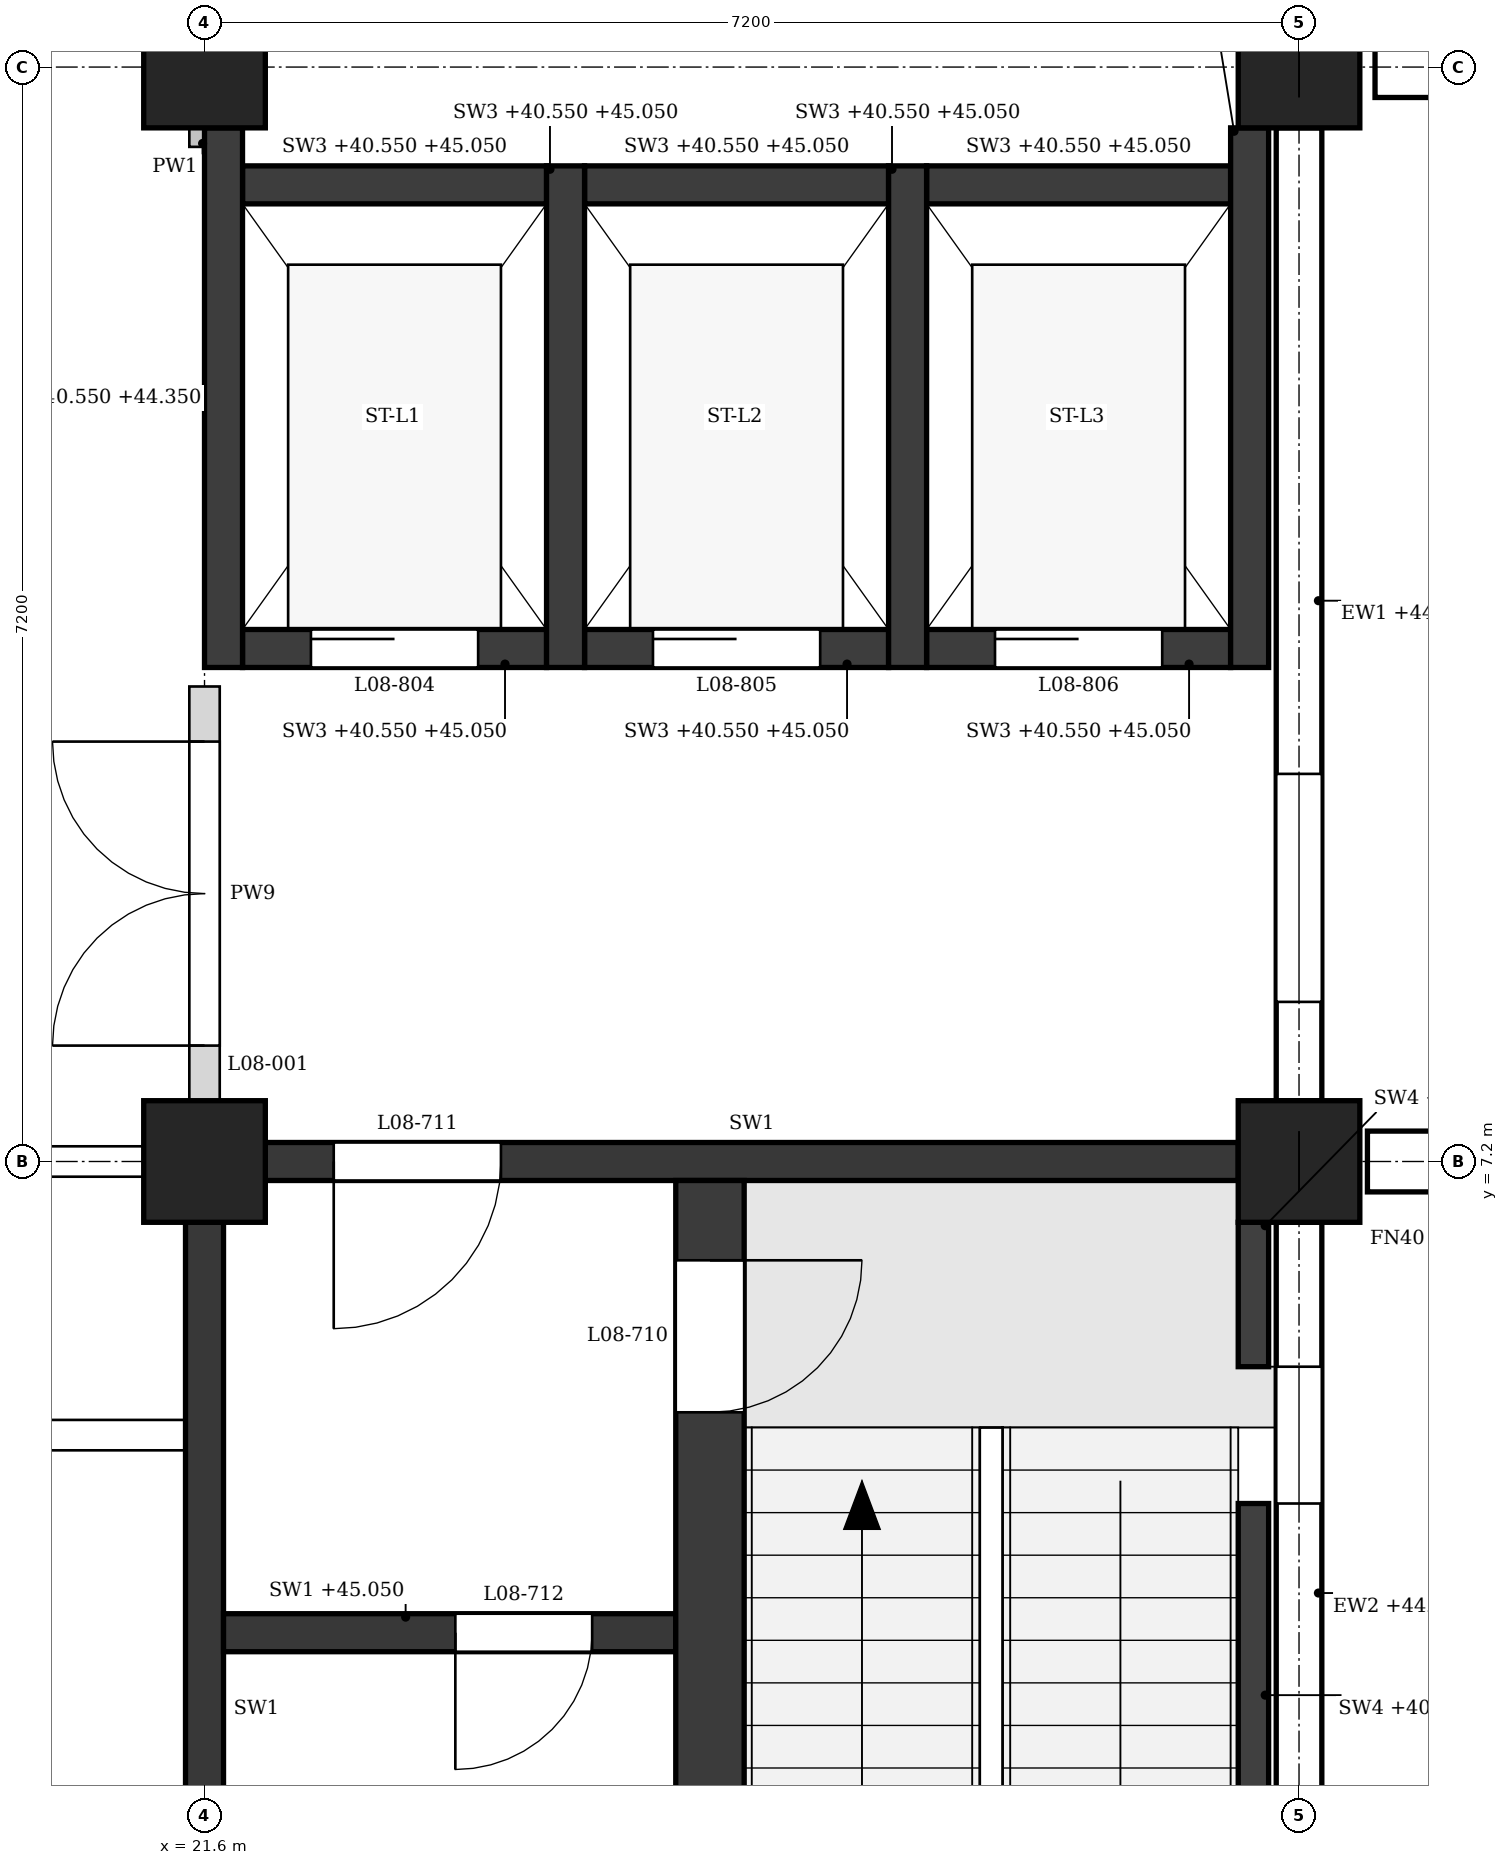
"""IFC4 building model, lengths in metres.
Left out: names, types, materials, properties, quantities, classifications, styles, units other than length and angle.
Written with IfcOpenShell. Run it as: python <this file> out.ifc"""

import sys

from ifc_helpers import new_model, si_unit, direction, frame, frame_2d, origin, origin_2d, place, context, subcontext, project, spatial, polyline, rectangle, outline, extrude, element, fill, save


model = new_model("IFC4")
c1 = context("Model", 3, precision=1e-05, world=origin(), true_north=direction((0.0, 1.0)))
c2 = subcontext(c1, "Body", "Model", "MODEL_VIEW")
j1 = project(units=[si_unit("LENGTHUNIT", "METRE"), si_unit("PLANEANGLEUNIT", "RADIAN")], contexts=[c1])
p1 = place(None, origin())
s1 = spatial("IfcSite", under=j1, at=p1, CompositionType="ELEMENT")
p2 = place(p1, origin())
s2 = spatial("IfcBuilding", under=s1, at=p2, CompositionType="ELEMENT")
p3 = place(p2, frame((0.0, 0.0, 40.8)))
s3 = spatial("IfcBuildingStorey", under=s2, at=p3, CompositionType="ELEMENT", Elevation=40.8)
for number, where, z_axis, x_axis in (
    (1, (21.6, 7.2, 0.0), (0.0, 0.0, 1.0), (1.0, 0.0, 0.0)),
    (2, (21.6, 14.4, 0.0), (0.0, 0.0, 1.0), (1.0, 0.0, 0.0)),
    (3, (28.8, 7.2, 0.0), (0.0, 0.0, 1.0), (1.0, 0.0, 0.0)),
    (4, (28.8, 14.4, 0.0), (0.0, 0.0, 1.0), (1.0, 0.0, 0.0)),
):
    element("IfcColumn", number, at=place(p3, frame(where, z_axis=z_axis, x_axis=x_axis)), inside=s3, PredefinedType="COLUMN", context=c2, shape_type="SweptSolid", body=[
        extrude(rectangle(XDim=0.8, YDim=0.8, at=origin_2d()), origin(), (0.0, 0.0, 1.0), 4.5),
    ])
p4 = place(p3, frame((28.8, 0.4, 0.0), z_axis=(0.0, 0.0, 1.0), x_axis=(0.0, 1.0, 0.0)))
e5 = element("IfcWall", 5, at=p4, inside=s3, PredefinedType="STANDARD", context=c2, shape_type="SweptSolid", body=[
    extrude(rectangle(XDim=6.4, YDim=0.3, at=frame_2d((3.2, 0.0))), origin(), (0.0, 0.0, 1.0), 3.65),
])
p5 = place(p4, frame((0.95, 0.0, 0.9)))
e6 = element("IfcOpeningElement", 6, at=p5, cuts=e5, PredefinedType="OPENING", context=c2, shape_type="SweptSolid", body=[
    extrude(outline(polyline([(0.0, 0.0), (0.9, 0.0), (0.9, 2.25), (0.45, 2.7), (0.0, 2.25), (0.0, 0.0)])), frame((0.0, 0.16, 0.0), z_axis=(0.0, -1.0, 0.0), x_axis=(1.0, 0.0, 0.0)), (0.0, 0.0, 1.0), 0.32),
])
p6 = place(p4, frame((4.55, 0.0, 0.9)))
e7 = element("IfcOpeningElement", 7, at=p6, cuts=e5, PredefinedType="OPENING", context=c2, shape_type="SweptSolid", body=[
    extrude(outline(polyline([(0.0, 0.0), (0.9, 0.0), (0.9, 2.25), (0.45, 2.7), (0.0, 2.25), (0.0, 0.0)])), frame((0.0, 0.16, 0.0), z_axis=(0.0, -1.0, 0.0), x_axis=(1.0, 0.0, 0.0)), (0.0, 0.0, 1.0), 0.32),
])
p7 = place(p3, frame((28.8, 7.6, 0.0), z_axis=(0.0, 0.0, 1.0), x_axis=(0.0, 1.0, 0.0)))
e8 = element("IfcWall", 8, at=p7, inside=s3, PredefinedType="STANDARD", context=c2, shape_type="SweptSolid", body=[
    extrude(rectangle(XDim=6.4, YDim=0.3, at=frame_2d((3.2, 0.0))), origin(), (0.0, 0.0, 1.0), 3.65),
])
p8 = place(p7, frame((0.65, 0.0, 0.9)))
e9 = element("IfcOpeningElement", 9, at=p8, cuts=e8, PredefinedType="OPENING", context=c2, shape_type="SweptSolid", body=[
    extrude(outline(polyline([(0.0, 0.0), (1.5, 0.0), (1.5, 1.95), (0.75, 2.7), (0.0, 1.95), (0.0, 0.0)])), frame((0.0, 0.16, 0.0), z_axis=(0.0, -1.0, 0.0), x_axis=(1.0, 0.0, 0.0)), (0.0, 0.0, 1.0), 0.32),
])
for number, where, z_axis, x_axis in (
    (10, (29.25, 7.2, -0.25), (0.0, 0.0, 1.0), (1.0, 0.0, 0.0)),
    (11, (29.3, 14.4, -0.25), (0.0, 0.0, 1.0), (1.0, 0.0, 0.0)),
):
    element("IfcWall", number, at=place(p3, frame(where, z_axis=z_axis, x_axis=x_axis)), inside=s3, PredefinedType="POLYGONAL", context=c2, shape_type="SweptSolid", body=[
        extrude(outline(polyline([(0.55, 0.0), (0.55, 17.925), (0.5, 18.0), (0.0, 18.0), (0.0, 0.0), (0.55, 0.0)])), frame((0.0, 0.2, 0.0), z_axis=(0.0, -1.0, 0.0), x_axis=(1.0, 0.0, 0.0)), (0.0, 0.0, 1.0), 0.4),
    ])
p9 = place(p3, frame((22.0, 7.2, 0.0), z_axis=(0.0, 0.0, 1.0), x_axis=(1.0, 0.0, 0.0)))
e12 = element("IfcWall", 12, at=p9, inside=s3, PredefinedType="SHEAR", context=c2, shape_type="SweptSolid", body=[
    extrude(rectangle(XDim=6.4, YDim=0.25, at=frame_2d((3.2, 0.0))), origin(), (0.0, 0.0, 1.0), 3.55),
])
p10 = place(p9, frame((0.45, 0.0, 0.0)))
e13 = element("IfcOpeningElement", 13, at=p10, cuts=e12, PredefinedType="OPENING", context=c2, shape_type="SweptSolid", body=[
    extrude(rectangle(XDim=1.1, YDim=2.1, at=frame_2d((0.55, 1.05))), frame((0.0, 0.135, 0.0), z_axis=(0.0, -1.0, 0.0), x_axis=(1.0, 0.0, 0.0)), (0.0, 0.0, 1.0), 0.27),
])
p11 = place(p3, frame((21.6, 0.4, 0.0), z_axis=(0.0, 0.0, 1.0), x_axis=(0.0, 1.0, 0.0)))
e14 = element("IfcWall", 14, at=p11, inside=s3, PredefinedType="SHEAR", context=c2, shape_type="SweptSolid", body=[
    extrude(rectangle(XDim=6.4, YDim=0.25, at=frame_2d((3.2, 0.0))), origin(), (0.0, 0.0, 1.0), 3.55),
])
p12 = place(p3, frame((28.5, 2.25, -0.25), z_axis=(0.0, 0.0, 1.0), x_axis=(0.0, 1.0, 0.0)))
e15 = element("IfcWall", 15, at=p12, inside=s3, PredefinedType="SHEAR", context=c2, shape_type="SweptSolid", body=[
    extrude(rectangle(XDim=2.7, YDim=0.2, at=frame_2d((1.35, 0.0))), origin(), (0.0, 0.0, 1.0), 4.5),
])
p13 = place(p3, frame((28.5, 5.85, -0.25), z_axis=(0.0, 0.0, 1.0), x_axis=(0.0, 1.0, 0.0)))
e16 = element("IfcWall", 16, at=p13, inside=s3, PredefinedType="SHEAR", context=c2, shape_type="SweptSolid", body=[
    extrude(rectangle(XDim=0.95, YDim=0.2, at=frame_2d((0.475, 0.0))), origin(), (0.0, 0.0, 1.0), 4.5),
])
p14 = place(p3, frame((24.925, 0.15, 0.0), z_axis=(0.0, 0.0, 1.0), x_axis=(0.0, 1.0, 0.0)))
e17 = element("IfcWall", 17, at=p14, inside=s3, PredefinedType="SHEAR", context=c2, shape_type="SweptSolid", body=[
    extrude(rectangle(XDim=6.925, YDim=0.45, at=frame_2d((3.462, 0.0))), origin(), (0.0, 0.0, 1.0), 4.25),
])
p15 = place(p14, frame((5.4, 0.0, 0.0)))
e18 = element("IfcOpeningElement", 18, at=p15, cuts=e17, PredefinedType="OPENING", context=c2, shape_type="SweptSolid", body=[
    extrude(rectangle(XDim=1.0, YDim=2.1, at=frame_2d((0.5, 1.05))), frame((0.0, 0.235, 0.0), z_axis=(0.0, -1.0, 0.0), x_axis=(1.0, 0.0, 0.0)), (0.0, 0.0, 1.0), 0.47),
])
p16 = place(p3, frame((21.725, 4.1, 0.0), z_axis=(0.0, 0.0, 1.0), x_axis=(1.0, 0.0, 0.0)))
e19 = element("IfcWall", 19, at=p16, inside=s3, PredefinedType="SHEAR", context=c2, shape_type="SweptSolid", body=[
    extrude(rectangle(XDim=2.975, YDim=0.25, at=frame_2d((1.487, 0.0))), origin(), (0.0, 0.0, 1.0), 4.25),
])
p17 = place(p16, frame((1.525, 0.0, 0.0)))
e20 = element("IfcOpeningElement", 20, at=p17, cuts=e19, PredefinedType="OPENING", context=c2, shape_type="SweptSolid", body=[
    extrude(rectangle(XDim=0.9, YDim=2.1, at=frame_2d((0.45, 1.05))), frame((0.0, 0.135, 0.0), z_axis=(0.0, -1.0, 0.0), x_axis=(1.0, 0.0, 0.0)), (0.0, 0.0, 1.0), 0.27),
])
p18 = place(p3, frame((21.725, 10.45, -0.25), z_axis=(0.0, 0.0, 1.0), x_axis=(0.0, 1.0, 0.0)))
e21 = element("IfcWall", 21, at=p18, inside=s3, PredefinedType="SHEAR", context=c2, shape_type="SweptSolid", body=[
    extrude(rectangle(XDim=3.55, YDim=0.25, at=frame_2d((1.775, 0.0))), origin(), (0.0, 0.0, 1.0), 3.8),
])
for number, where, z_axis, x_axis in (
    (22, (23.975, 10.45, -0.25), (0.0, 0.0, 1.0), (0.0, 1.0, 0.0)),
    (23, (26.225, 10.45, -0.25), (0.0, 0.0, 1.0), (0.0, 1.0, 0.0)),
):
    element("IfcWall", number, at=place(p3, frame(where, z_axis=z_axis, x_axis=x_axis)), inside=s3, PredefinedType="SHEAR", context=c2, shape_type="SweptSolid", body=[
        extrude(rectangle(XDim=3.3, YDim=0.25, at=frame_2d((1.65, 0.0))), origin(), (0.0, 0.0, 1.0), 4.5),
    ])
p19 = place(p3, frame((28.475, 10.45, -0.25), z_axis=(0.0, 0.0, 1.0), x_axis=(0.0, 1.0, 0.0)))
e24 = element("IfcWall", 24, at=p19, inside=s3, PredefinedType="SHEAR", context=c2, shape_type="SweptSolid", body=[
    extrude(rectangle(XDim=3.55, YDim=0.25, at=frame_2d((1.775, 0.0))), origin(), (0.0, 0.0, 1.0), 4.5),
])
p20 = place(p3, frame((21.85, 10.575, -0.25), z_axis=(0.0, 0.0, 1.0), x_axis=(1.0, 0.0, 0.0)))
e25 = element("IfcWall", 25, at=p20, inside=s3, PredefinedType="SHEAR", context=c2, shape_type="SweptSolid", body=[
    extrude(rectangle(XDim=2.0, YDim=0.25, at=frame_2d((1.0, 0.0))), origin(), (0.0, 0.0, 1.0), 4.5),
])
p21 = place(p20, frame((0.45, 0.0, 0.25)))
e26 = element("IfcOpeningElement", 26, at=p21, cuts=e25, PredefinedType="OPENING", context=c2, shape_type="SweptSolid", body=[
    extrude(rectangle(XDim=1.1, YDim=2.1, at=frame_2d((0.55, 1.05))), frame((0.0, 0.135, 0.0), z_axis=(0.0, -1.0, 0.0), x_axis=(1.0, 0.0, 0.0)), (0.0, 0.0, 1.0), 0.27),
])
p22 = place(p3, frame((21.85, 13.625, -0.25), z_axis=(0.0, 0.0, 1.0), x_axis=(1.0, 0.0, 0.0)))
e27 = element("IfcWall", 27, at=p22, inside=s3, PredefinedType="SHEAR", context=c2, shape_type="SweptSolid", body=[
    extrude(rectangle(XDim=2.0, YDim=0.25, at=frame_2d((1.0, 0.0))), origin(), (0.0, 0.0, 1.0), 4.5),
])
p23 = place(p3, frame((24.1, 10.575, -0.25), z_axis=(0.0, 0.0, 1.0), x_axis=(1.0, 0.0, 0.0)))
e28 = element("IfcWall", 28, at=p23, inside=s3, PredefinedType="SHEAR", context=c2, shape_type="SweptSolid", body=[
    extrude(rectangle(XDim=2.0, YDim=0.25, at=frame_2d((1.0, 0.0))), origin(), (0.0, 0.0, 1.0), 4.5),
])
p24 = place(p23, frame((0.45, 0.0, 0.25)))
e29 = element("IfcOpeningElement", 29, at=p24, cuts=e28, PredefinedType="OPENING", context=c2, shape_type="SweptSolid", body=[
    extrude(rectangle(XDim=1.1, YDim=2.1, at=frame_2d((0.55, 1.05))), frame((0.0, 0.135, 0.0), z_axis=(0.0, -1.0, 0.0), x_axis=(1.0, 0.0, 0.0)), (0.0, 0.0, 1.0), 0.27),
])
p25 = place(p3, frame((24.1, 13.625, -0.25), z_axis=(0.0, 0.0, 1.0), x_axis=(1.0, 0.0, 0.0)))
e30 = element("IfcWall", 30, at=p25, inside=s3, PredefinedType="SHEAR", context=c2, shape_type="SweptSolid", body=[
    extrude(rectangle(XDim=2.0, YDim=0.25, at=frame_2d((1.0, 0.0))), origin(), (0.0, 0.0, 1.0), 4.5),
])
p26 = place(p3, frame((26.35, 10.575, -0.25), z_axis=(0.0, 0.0, 1.0), x_axis=(1.0, 0.0, 0.0)))
e31 = element("IfcWall", 31, at=p26, inside=s3, PredefinedType="SHEAR", context=c2, shape_type="SweptSolid", body=[
    extrude(rectangle(XDim=2.0, YDim=0.25, at=frame_2d((1.0, 0.0))), origin(), (0.0, 0.0, 1.0), 4.5),
])
p27 = place(p26, frame((0.45, 0.0, 0.25)))
e32 = element("IfcOpeningElement", 32, at=p27, cuts=e31, PredefinedType="OPENING", context=c2, shape_type="SweptSolid", body=[
    extrude(rectangle(XDim=1.1, YDim=2.1, at=frame_2d((0.55, 1.05))), frame((0.0, 0.135, 0.0), z_axis=(0.0, -1.0, 0.0), x_axis=(1.0, 0.0, 0.0)), (0.0, 0.0, 1.0), 0.27),
])
p28 = place(p3, frame((26.35, 13.625, -0.25), z_axis=(0.0, 0.0, 1.0), x_axis=(1.0, 0.0, 0.0)))
e33 = element("IfcWall", 33, at=p28, inside=s3, PredefinedType="SHEAR", context=c2, shape_type="SweptSolid", body=[
    extrude(rectangle(XDim=2.0, YDim=0.25, at=frame_2d((1.0, 0.0))), origin(), (0.0, 0.0, 1.0), 4.5),
])
p29 = place(p3, frame((7.325, 5.4, 0.0), z_axis=(0.0, 0.0, 1.0), x_axis=(1.0, 0.0, 0.0)))
e34 = element("IfcWall", 34, at=p29, inside=s3, PredefinedType="PARTITIONING", context=c2, shape_type="SweptSolid", body=[
    extrude(outline(polyline([(0.0, 0.0), (14.15, 0.0), (14.15, 3.55), (14.05, 3.55), (14.05, 4.25), (7.3, 4.25), (7.3, 3.55), (6.85, 3.55), (6.85, 4.25), (0.1, 4.25), (0.1, 3.55), (0.0, 3.55), (0.0, 0.0)])), frame((0.0, 0.1, 0.0), z_axis=(0.0, -1.0, 0.0), x_axis=(1.0, 0.0, 0.0)), (0.0, 0.0, 1.0), 0.2),
])
p30 = place(p29, frame((1.238, 0.0, 0.0)))
e35 = element("IfcOpeningElement", 35, at=p30, cuts=e34, PredefinedType="OPENING", context=c2, shape_type="SweptSolid", body=[
    extrude(rectangle(XDim=1.0, YDim=2.1, at=frame_2d((0.5, 1.05))), frame((0.0, 0.11, 0.0), z_axis=(0.0, -1.0, 0.0), x_axis=(1.0, 0.0, 0.0)), (0.0, 0.0, 1.0), 0.22),
])
p31 = place(p29, frame((4.775, 0.0, 0.0)))
e36 = element("IfcOpeningElement", 36, at=p31, cuts=e34, PredefinedType="OPENING", context=c2, shape_type="SweptSolid", body=[
    extrude(rectangle(XDim=1.0, YDim=2.1, at=frame_2d((0.5, 1.05))), frame((0.0, 0.11, 0.0), z_axis=(0.0, -1.0, 0.0), x_axis=(1.0, 0.0, 0.0)), (0.0, 0.0, 1.0), 0.22),
])
p32 = place(p29, frame((8.375, 0.0, 0.0)))
e37 = element("IfcOpeningElement", 37, at=p32, cuts=e34, PredefinedType="OPENING", context=c2, shape_type="SweptSolid", body=[
    extrude(rectangle(XDim=1.0, YDim=2.1, at=frame_2d((0.5, 1.05))), frame((0.0, 0.11, 0.0), z_axis=(0.0, -1.0, 0.0), x_axis=(1.0, 0.0, 0.0)), (0.0, 0.0, 1.0), 0.22),
])
p33 = place(p29, frame((11.913, 0.0, 0.0)))
e38 = element("IfcOpeningElement", 38, at=p33, cuts=e34, PredefinedType="OPENING", context=c2, shape_type="SweptSolid", body=[
    extrude(rectangle(XDim=1.0, YDim=2.1, at=frame_2d((0.5, 1.05))), frame((0.0, 0.11, 0.0), z_axis=(0.0, -1.0, 0.0), x_axis=(1.0, 0.0, 0.0)), (0.0, 0.0, 1.0), 0.22),
])
p34 = place(p3, frame((14.8, 7.2, 0.0), z_axis=(0.0, 0.0, 1.0), x_axis=(1.0, 0.0, 0.0)))
e39 = element("IfcWall", 39, at=p34, inside=s3, PredefinedType="PARTITIONING", context=c2, shape_type="SweptSolid", body=[
    extrude(rectangle(XDim=6.4, YDim=0.2, at=frame_2d((3.2, 0.0))), origin(), (0.0, 0.0, 1.0), 3.55),
])
p35 = place(p34, frame((4.3, 0.0, 0.0)))
e40 = element("IfcOpeningElement", 40, at=p35, cuts=e39, PredefinedType="OPENING", context=c2, shape_type="SweptSolid", body=[
    extrude(rectangle(XDim=1.0, YDim=2.1, at=frame_2d((0.5, 1.05))), frame((0.0, 0.11, 0.0), z_axis=(0.0, -1.0, 0.0), x_axis=(1.0, 0.0, 0.0)), (0.0, 0.0, 1.0), 0.22),
])
p36 = place(p3, frame((21.6, 7.6, 0.0), z_axis=(0.0, 0.0, 1.0), x_axis=(0.0, 1.0, 0.0)))
e41 = element("IfcWall", 41, at=p36, inside=s3, PredefinedType="PARTITIONING", context=c2, shape_type="SweptSolid", body=[
    extrude(rectangle(XDim=2.725, YDim=0.2, at=frame_2d((1.362, 0.0))), origin(), (0.0, 0.0, 1.0), 3.55),
])
p37 = place(p36, frame((0.362, 0.0, 0.0)))
e42 = element("IfcOpeningElement", 42, at=p37, cuts=e41, PredefinedType="OPENING", context=c2, shape_type="SweptSolid", body=[
    extrude(rectangle(XDim=2.0, YDim=2.4, at=frame_2d((1.0, 1.2))), frame((0.0, 0.11, 0.0), z_axis=(0.0, -1.0, 0.0), x_axis=(1.0, 0.0, 0.0)), (0.0, 0.0, 1.0), 0.22),
])
p38 = place(p3, frame((21.6, 13.875, 0.0), z_axis=(0.0, 0.0, 1.0), x_axis=(0.0, 1.0, 0.0)))
e43 = element("IfcWall", 43, at=p38, inside=s3, PredefinedType="PARTITIONING", context=c2, shape_type="SweptSolid", body=[
    extrude(rectangle(XDim=0.125, YDim=0.2, at=frame_2d((0.062, 0.0))), origin(), (0.0, 0.0, 1.0), 3.55),
])
p39 = place(p6, origin())
e44 = element("IfcWindow", 44, at=p39, inside=s3, PartitioningType="SINGLE_PANEL", PredefinedType="WINDOW", context=c2, shape_type="SweptSolid", body=[
    extrude(outline(polyline([(0.0, 0.0), (0.9, 0.0), (0.9, 2.25), (0.45, 2.7), (0.0, 2.25), (0.0, 0.0)])), frame((0.0, 0.03, 0.0), z_axis=(0.0, -1.0, 0.0), x_axis=(1.0, 0.0, 0.0)), (0.0, 0.0, 1.0), 0.06),
])
fill(e7, e44)
p40 = place(p8, origin())
e45 = element("IfcWindow", 45, at=p40, inside=s3, PartitioningType="SINGLE_PANEL", PredefinedType="WINDOW", context=c2, shape_type="SweptSolid", body=[
    extrude(outline(polyline([(0.0, 0.0), (1.5, 0.0), (1.5, 1.95), (0.75, 2.7), (0.0, 1.95), (0.0, 0.0)])), frame((0.0, 0.03, 0.0), z_axis=(0.0, -1.0, 0.0), x_axis=(1.0, 0.0, 0.0)), (0.0, 0.0, 1.0), 0.06),
])
fill(e9, e45)
p41 = place(p15, frame((1.0, 0.0, 0.0), z_axis=(0.0, 0.0, 1.0), x_axis=(-1.0, 0.0, 0.0)))
e46 = element("IfcDoor", 46, at=p41, inside=s3, OperationType="SINGLE_SWING_LEFT", PredefinedType="DOOR", context=c2, shape_type="SweptSolid", body=[
    extrude(rectangle(XDim=1.0, YDim=2.1, at=frame_2d((0.5, 1.05))), frame((0.0, 0.025, 0.0), z_axis=(0.0, -1.0, 0.0), x_axis=(1.0, 0.0, 0.0)), (0.0, 0.0, 1.0), 0.05),
])
fill(e18, e46)
p42 = place(p10, frame((1.1, 0.0, 0.0), z_axis=(0.0, 0.0, 1.0), x_axis=(-1.0, 0.0, 0.0)))
e47 = element("IfcDoor", 47, at=p42, inside=s3, OperationType="SINGLE_SWING_RIGHT", PredefinedType="DOOR", context=c2, shape_type="SweptSolid", body=[
    extrude(rectangle(XDim=1.1, YDim=2.1, at=frame_2d((0.55, 1.05))), frame((0.0, 0.025, 0.0), z_axis=(0.0, -1.0, 0.0), x_axis=(1.0, 0.0, 0.0)), (0.0, 0.0, 1.0), 0.05),
])
fill(e13, e47)
p43 = place(p17, frame((0.9, 0.0, 0.0), z_axis=(0.0, 0.0, 1.0), x_axis=(-1.0, 0.0, 0.0)))
e48 = element("IfcDoor", 48, at=p43, inside=s3, OperationType="SINGLE_SWING_RIGHT", PredefinedType="DOOR", context=c2, shape_type="SweptSolid", body=[
    extrude(rectangle(XDim=0.9, YDim=2.1, at=frame_2d((0.45, 1.05))), frame((0.0, 0.025, 0.0), z_axis=(0.0, -1.0, 0.0), x_axis=(1.0, 0.0, 0.0)), (0.0, 0.0, 1.0), 0.05),
])
fill(e20, e48)
p44 = place(p21, origin())
e49 = element("IfcDoor", 49, at=p44, inside=s3, OperationType="SLIDING_TO_LEFT", PredefinedType="DOOR", context=c2, shape_type="SweptSolid", body=[
    extrude(rectangle(XDim=1.1, YDim=2.1, at=frame_2d((0.55, 1.05))), frame((0.0, 0.025, 0.0), z_axis=(0.0, -1.0, 0.0), x_axis=(1.0, 0.0, 0.0)), (0.0, 0.0, 1.0), 0.05),
])
fill(e26, e49)
p45 = place(p24, origin())
e50 = element("IfcDoor", 50, at=p45, inside=s3, OperationType="SLIDING_TO_LEFT", PredefinedType="DOOR", context=c2, shape_type="SweptSolid", body=[
    extrude(rectangle(XDim=1.1, YDim=2.1, at=frame_2d((0.55, 1.05))), frame((0.0, 0.025, 0.0), z_axis=(0.0, -1.0, 0.0), x_axis=(1.0, 0.0, 0.0)), (0.0, 0.0, 1.0), 0.05),
])
fill(e29, e50)
p46 = place(p27, origin())
e51 = element("IfcDoor", 51, at=p46, inside=s3, OperationType="SLIDING_TO_LEFT", PredefinedType="DOOR", context=c2, shape_type="SweptSolid", body=[
    extrude(rectangle(XDim=1.1, YDim=2.1, at=frame_2d((0.55, 1.05))), frame((0.0, 0.025, 0.0), z_axis=(0.0, -1.0, 0.0), x_axis=(1.0, 0.0, 0.0)), (0.0, 0.0, 1.0), 0.05),
])
fill(e32, e51)
p47 = place(p37, origin())
e52 = element("IfcDoor", 52, at=p47, inside=s3, OperationType="DOUBLE_DOOR_SINGLE_SWING", PredefinedType="DOOR", context=c2, shape_type="SweptSolid", body=[
    extrude(rectangle(XDim=2.0, YDim=2.4, at=frame_2d((1.0, 1.2))), frame((0.0, 0.025, 0.0), z_axis=(0.0, -1.0, 0.0), x_axis=(1.0, 0.0, 0.0)), (0.0, 0.0, 1.0), 0.05),
])
fill(e42, e52)
save(model, sys.argv[1])
